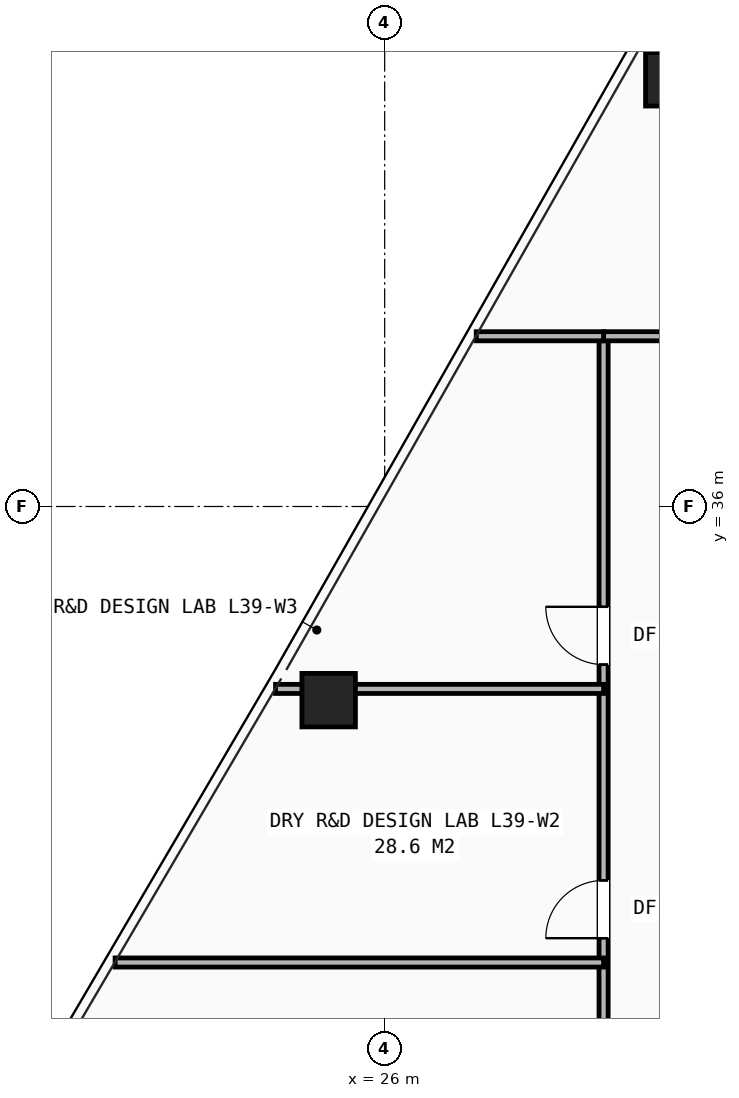
"""IFC4 building model, lengths in metres.
Left out: names, types, materials, properties, quantities, classifications, styles, units other than length and angle.
Written with IfcOpenShell. Run it as: python <this file> out.ifc"""

import sys

from ifc_helpers import new_model, si_unit, direction, frame, frame_2d, origin, origin_2d, place, context, subcontext, project, spatial, rectangle, hollow_rectangle, extrude, element, fill, save


model = new_model("IFC4")
c1 = context("Model", 3, precision=1e-05, world=origin(), true_north=direction((0.0, 1.0)))
c2 = subcontext(c1, "Body", "Model", "MODEL_VIEW")
j1 = project(units=[si_unit("LENGTHUNIT", "METRE"), si_unit("PLANEANGLEUNIT", "RADIAN")], contexts=[c1])
p1 = place(None, origin())
s1 = spatial("IfcSite", under=j1, at=p1, CompositionType="ELEMENT")
p2 = place(p1, origin())
s2 = spatial("IfcBuilding", under=s1, at=p2, CompositionType="ELEMENT")
p3 = place(p2, frame((0.0, 0.0, 136.7)))
s3 = spatial("IfcBuildingStorey", under=s2, at=p3, CompositionType="ELEMENT", Elevation=136.7)
for number, where, z_axis, x_axis in (
    (1, (30.73, 43.026, 0.0), (0.0, 0.0, 1.0), (1.0, 0.0, 0.0)),
    (2, (25.079, 32.815, 0.0), (0.0, 0.0, 1.0), (1.0, 0.0, 0.0)),
):
    element("IfcColumn", number, at=place(p3, frame(where, z_axis=z_axis, x_axis=x_axis)), inside=s3, PredefinedType="COLUMN", context=c2, shape_type="SweptSolid", body=[
        extrude(hollow_rectangle(XDim=0.88, YDim=0.88, WallThickness=0.06, at=origin_2d()), origin(), (0.0, 0.0, 1.0), 3.45),
    ])
p4 = place(p3, frame((29.6, 24.9, 0.0), z_axis=(0.0, 0.0, 1.0), x_axis=(0.0, 1.0, 0.0)))
e3 = element("IfcWall", 3, at=p4, inside=s3, PredefinedType="PARTITIONING", context=c2, shape_type="SweptSolid", body=[
    extrude(rectangle(XDim=13.9, YDim=0.15, at=frame_2d((6.95, 0.0))), origin(), (0.0, 0.0, 1.0), 2.225),
])
p5 = place(p4, frame((0.4, 0.0, 0.0)))
e4 = element("IfcOpeningElement", 4, at=p5, cuts=e3, PredefinedType="OPENING", context=c2, shape_type="SweptSolid", body=[
    extrude(rectangle(XDim=0.95, YDim=2.1, at=frame_2d((0.475, 1.05))), frame((0.0, 0.085, 0.0), z_axis=(0.0, -1.0, 0.0), x_axis=(1.0, 0.0, 0.0)), (0.0, 0.0, 1.0), 0.17),
])
p6 = place(p4, frame((4.0, 0.0, 0.0)))
e5 = element("IfcOpeningElement", 5, at=p6, cuts=e3, PredefinedType="OPENING", context=c2, shape_type="SweptSolid", body=[
    extrude(rectangle(XDim=0.95, YDim=2.1, at=frame_2d((0.475, 1.05))), frame((0.0, 0.085, 0.0), z_axis=(0.0, -1.0, 0.0), x_axis=(1.0, 0.0, 0.0)), (0.0, 0.0, 1.0), 0.17),
])
p7 = place(p4, frame((8.5, 0.0, 0.0)))
e6 = element("IfcOpeningElement", 6, at=p7, cuts=e3, PredefinedType="OPENING", context=c2, shape_type="SweptSolid", body=[
    extrude(rectangle(XDim=0.95, YDim=2.1, at=frame_2d((0.475, 1.05))), frame((0.0, 0.085, 0.0), z_axis=(0.0, -1.0, 0.0), x_axis=(1.0, 0.0, 0.0)), (0.0, 0.0, 1.0), 0.17),
])
p8 = place(p3, frame((29.6, 38.8, 0.0), z_axis=(0.0, 0.0, 1.0), x_axis=(1.0, 0.0, 0.0)))
e7 = element("IfcWall", 7, at=p8, inside=s3, PredefinedType="PARTITIONING", context=c2, shape_type="SweptSolid", body=[
    extrude(rectangle(XDim=2.2, YDim=0.15, at=frame_2d((1.1, 0.0))), origin(), (0.0, 0.0, 1.0), 2.743),
])
p9 = place(p3, frame((27.506, 38.8, 0.0), z_axis=(0.0, 0.0, 1.0), x_axis=(1.0, 0.0, 0.0)))
e8 = element("IfcWall", 8, at=p9, inside=s3, PredefinedType="PARTITIONING", context=c2, shape_type="SweptSolid", body=[
    extrude(rectangle(XDim=2.094, YDim=0.15, at=frame_2d((1.047, 0.0))), origin(), (0.0, 0.0, 1.0), 2.589),
])
p10 = place(p3, frame((21.566, 28.5, 0.0), z_axis=(0.0, 0.0, 1.0), x_axis=(1.0, 0.0, 0.0)))
e9 = element("IfcWall", 9, at=p10, inside=s3, PredefinedType="PARTITIONING", context=c2, shape_type="SweptSolid", body=[
    extrude(rectangle(XDim=8.034, YDim=0.15, at=frame_2d((4.017, 0.0))), origin(), (0.0, 0.0, 1.0), 2.589),
])
p11 = place(p3, frame((24.205, 33.0, 0.0), z_axis=(0.0, 0.0, 1.0), x_axis=(1.0, 0.0, 0.0)))
e10 = element("IfcWall", 10, at=p11, inside=s3, PredefinedType="PARTITIONING", context=c2, shape_type="SweptSolid", body=[
    extrude(rectangle(XDim=5.395, YDim=0.15, at=frame_2d((2.697, 0.0))), origin(), (0.0, 0.0, 1.0), 2.225),
])
p12 = place(p6, origin())
e11 = element("IfcDoor", 11, at=p12, inside=s3, OperationType="SINGLE_SWING_LEFT", PredefinedType="DOOR", context=c2, shape_type="SweptSolid", body=[
    extrude(rectangle(XDim=0.95, YDim=2.1, at=frame_2d((0.475, 1.05))), frame((0.0, 0.025, 0.0), z_axis=(0.0, -1.0, 0.0), x_axis=(1.0, 0.0, 0.0)), (0.0, 0.0, 1.0), 0.05),
])
fill(e5, e11)
p13 = place(p7, origin())
e12 = element("IfcDoor", 12, at=p13, inside=s3, OperationType="SINGLE_SWING_RIGHT", PredefinedType="DOOR", context=c2, shape_type="SweptSolid", body=[
    extrude(rectangle(XDim=0.95, YDim=2.1, at=frame_2d((0.475, 1.05))), frame((0.0, 0.025, 0.0), z_axis=(0.0, -1.0, 0.0), x_axis=(1.0, 0.0, 0.0)), (0.0, 0.0, 1.0), 0.05),
])
fill(e6, e12)
save(model, sys.argv[1])
